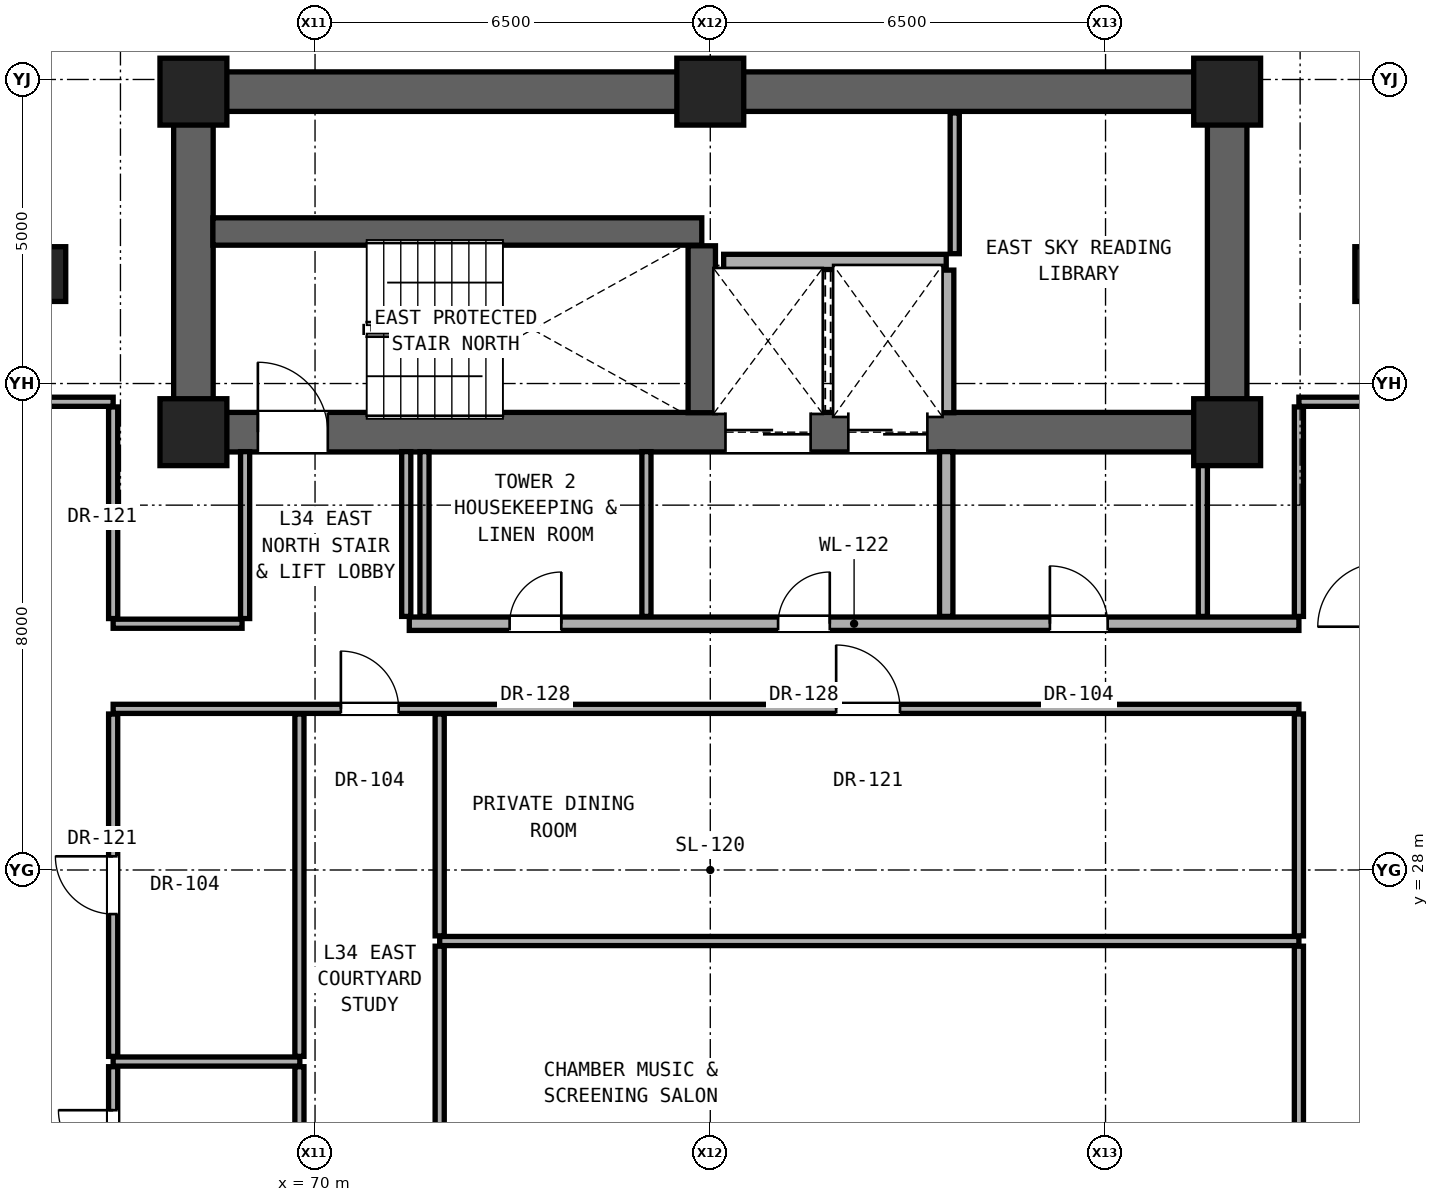
"""IFC4 building model, lengths in metres.
Left out: names, types, materials, properties, quantities, classifications, styles, units other than length and angle.
Written with IfcOpenShell. Run it as: python <this file> out.ifc"""

import sys

from ifc_helpers import new_model, si_unit, direction, frame, frame_2d, origin, origin_2d, place, context, subcontext, project, spatial, rectangle, extrude, element, fill, save


model = new_model("IFC4")
c1 = context("Model", 3, precision=1e-05, world=origin(), true_north=direction((0.0, 1.0)))
c2 = subcontext(c1, "Body", "Model", "MODEL_VIEW")
j1 = project(units=[si_unit("LENGTHUNIT", "METRE"), si_unit("PLANEANGLEUNIT", "RADIAN")], contexts=[c1])
p1 = place(None, origin())
s1 = spatial("IfcSite", under=j1, at=p1, CompositionType="ELEMENT")
p2 = place(p1, origin())
s2 = spatial("IfcBuilding", under=s1, at=p2, CompositionType="ELEMENT")
p3 = place(p2, frame((0.0, 0.0, 121.4)))
s3 = spatial("IfcBuildingStorey", under=s2, at=p3, CompositionType="ELEMENT", Elevation=121.4)
for number, where, z_axis, x_axis in (
    (1, (68.0, 35.2, 0.0), (0.0, 0.0, 1.0), (1.0, 0.0, 0.0)),
    (2, (85.0, 35.2, 0.0), (0.0, 0.0, 1.0), (1.0, 0.0, 0.0)),
    (3, (68.0, 40.8, 0.0), (0.0, 0.0, 1.0), (1.0, 0.0, 0.0)),
    (4, (76.5, 40.8, 0.0), (0.0, 0.0, 1.0), (1.0, 0.0, 0.0)),
    (5, (85.0, 40.8, 0.0), (0.0, 0.0, 1.0), (1.0, 0.0, 0.0)),
):
    element("IfcColumn", number, at=place(p3, frame(where, z_axis=z_axis, x_axis=x_axis)), inside=s3, PredefinedType="COLUMN", context=c2, shape_type="SweptSolid", body=[
        extrude(rectangle(XDim=1.1, YDim=1.1, at=origin_2d()), origin(), (0.0, 0.0, 1.0), 3.3),
    ])
for number, where, z_axis, x_axis in (
    (6, (65.6, 37.8, 0.0), (0.0, 0.0, 1.0), (1.0, 0.0, 0.0)),
    (7, (87.4, 37.8, 0.0), (0.0, 0.0, 1.0), (1.0, 0.0, 0.0)),
):
    element("IfcColumn", number, at=place(p3, frame(where, z_axis=z_axis, x_axis=x_axis)), inside=s3, PredefinedType="PILASTER", context=c2, shape_type="SweptSolid", body=[
        extrude(rectangle(XDim=0.6, YDim=0.9, at=origin_2d()), origin(), (0.0, 0.0, 1.0), 3.3),
    ])
p4 = place(p3, frame((68.0, 40.8, 0.0), z_axis=(0.0, 0.0, 1.0), x_axis=(1.0, 0.0, 0.0)))
e8 = element("IfcWall", 8, at=p4, inside=s3, PredefinedType="SHEAR", context=c2, shape_type="SweptSolid", body=[
    extrude(rectangle(XDim=17.0, YDim=0.65, at=frame_2d((8.5, 0.0))), origin(), (0.0, 0.0, 1.0), 3.08),
])
for number, where, z_axis, x_axis in (
    (9, (68.0, 35.2, 0.0), (0.0, 0.0, 1.0), (0.0, 1.0, 0.0)),
    (10, (85.0, 35.2, 0.0), (0.0, 0.0, 1.0), (0.0, 1.0, 0.0)),
):
    element("IfcWall", number, at=place(p3, frame(where, z_axis=z_axis, x_axis=x_axis)), inside=s3, PredefinedType="SHEAR", context=c2, shape_type="SweptSolid", body=[
        extrude(rectangle(XDim=5.6, YDim=0.65, at=frame_2d((2.8, 0.0))), origin(), (0.0, 0.0, 1.0), 3.08),
    ])
p5 = place(p3, frame((68.0, 35.2, 0.0), z_axis=(0.0, 0.0, 1.0), x_axis=(1.0, 0.0, 0.0)))
e11 = element("IfcWall", 11, at=p5, inside=s3, PredefinedType="SHEAR", context=c2, shape_type="SweptSolid", body=[
    extrude(rectangle(XDim=17.0, YDim=0.65, at=frame_2d((8.5, 0.0))), origin(), (0.0, 0.0, 1.0), 3.08),
])
p6 = place(p5, frame((1.06, 0.0, 0.0)))
e12 = element("IfcOpeningElement", 12, at=p6, cuts=e11, PredefinedType="OPENING", context=c2, shape_type="SweptSolid", body=[
    extrude(rectangle(XDim=1.15, YDim=2.2, at=frame_2d((0.575, 1.1))), frame((0.0, 0.335, 0.0), z_axis=(0.0, -1.0, 0.0), x_axis=(1.0, 0.0, 0.0)), (0.0, 0.0, 1.0), 0.67),
])
p7 = place(p5, frame((8.75, 0.0, 0.0)))
e13 = element("IfcOpeningElement", 13, at=p7, cuts=e11, PredefinedType="OPENING", context=c2, shape_type="SweptSolid", body=[
    extrude(rectangle(XDim=1.4, YDim=2.35, at=frame_2d((0.7, 1.175))), frame((0.0, 0.335, 0.0), z_axis=(0.0, -1.0, 0.0), x_axis=(1.0, 0.0, 0.0)), (0.0, 0.0, 1.0), 0.67),
])
p8 = place(p5, frame((10.77, 0.0, 0.0)))
e14 = element("IfcOpeningElement", 14, at=p8, cuts=e11, PredefinedType="OPENING", context=c2, shape_type="SweptSolid", body=[
    extrude(rectangle(XDim=1.3, YDim=2.3, at=frame_2d((0.65, 1.15))), frame((0.0, 0.335, 0.0), z_axis=(0.0, -1.0, 0.0), x_axis=(1.0, 0.0, 0.0)), (0.0, 0.0, 1.0), 0.67),
])
p9 = place(p3, frame((66.68, 24.85, 0.0), z_axis=(0.0, 0.0, 1.0), x_axis=(1.0, 0.0, 0.0)))
e15 = element("IfcWall", 15, at=p9, inside=s3, PredefinedType="PARTITIONING", context=c2, shape_type="SweptSolid", body=[
    extrude(rectangle(XDim=3.07, YDim=0.15, at=frame_2d((1.535, 0.0))), origin(), (0.0, 0.0, 1.0), 2.216),
])
p10 = place(p3, frame((72.05, 26.832, 0.0), z_axis=(0.0, 0.0, 1.0), x_axis=(1.0, 0.0, 0.0)))
e16 = element("IfcWall", 16, at=p10, inside=s3, PredefinedType="PARTITIONING", context=c2, shape_type="SweptSolid", body=[
    extrude(rectangle(XDim=14.13, YDim=0.15, at=frame_2d((7.065, 0.0))), origin(), (0.0, 0.0, 1.0), 2.216),
])
p11 = place(p3, frame((66.68, 30.65, 0.0), z_axis=(0.0, 0.0, 1.0), x_axis=(1.0, 0.0, 0.0)))
e17 = element("IfcWall", 17, at=p11, inside=s3, PredefinedType="PARTITIONING", context=c2, shape_type="SweptSolid", body=[
    extrude(rectangle(XDim=19.5, YDim=0.15, at=frame_2d((9.75, 0.0))), origin(), (0.0, 0.0, 1.0), 2.216),
])
p12 = place(p11, frame((3.745, 0.0, 0.0)))
e18 = element("IfcOpeningElement", 18, at=p12, cuts=e17, PredefinedType="OPENING", context=c2, shape_type="SweptSolid", body=[
    extrude(rectangle(XDim=0.95, YDim=2.15, at=frame_2d((0.475, 1.075))), frame((0.0, 0.085, 0.0), z_axis=(0.0, -1.0, 0.0), x_axis=(1.0, 0.0, 0.0)), (0.0, 0.0, 1.0), 0.17),
])
p13 = place(p11, frame((11.89, 0.0, 0.0)))
e19 = element("IfcOpeningElement", 19, at=p13, cuts=e17, PredefinedType="OPENING", context=c2, shape_type="SweptSolid", body=[
    extrude(rectangle(XDim=1.05, YDim=2.2, at=frame_2d((0.525, 1.1))), frame((0.0, 0.085, 0.0), z_axis=(0.0, -1.0, 0.0), x_axis=(1.0, 0.0, 0.0)), (0.0, 0.0, 1.0), 0.17),
])
p14 = place(p3, frame((66.68, 32.05, 0.0), z_axis=(0.0, 0.0, 1.0), x_axis=(1.0, 0.0, 0.0)))
e20 = element("IfcWall", 20, at=p14, inside=s3, PredefinedType="PARTITIONING", context=c2, shape_type="SweptSolid", body=[
    extrude(rectangle(XDim=2.12, YDim=0.15, at=frame_2d((1.06, 0.0))), origin(), (0.0, 0.0, 1.0), 2.216),
])
p15 = place(p3, frame((71.55, 32.05, 0.0), z_axis=(0.0, 0.0, 1.0), x_axis=(1.0, 0.0, 0.0)))
e21 = element("IfcWall", 21, at=p15, inside=s3, PredefinedType="SOLIDWALL", context=c2, shape_type="SweptSolid", body=[
    extrude(rectangle(XDim=14.63, YDim=0.22, at=frame_2d((7.315, 0.0))), origin(), (0.0, 0.0, 1.0), 2.216),
])
p16 = place(p15, frame((6.065, 0.0, 0.0)))
e22 = element("IfcOpeningElement", 22, at=p16, cuts=e21, PredefinedType="OPENING", context=c2, shape_type="SweptSolid", body=[
    extrude(rectangle(XDim=0.85, YDim=2.01, at=frame_2d((0.425, 1.005))), frame((0.0, 0.12, 0.0), z_axis=(0.0, -1.0, 0.0), x_axis=(1.0, 0.0, 0.0)), (0.0, 0.0, 1.0), 0.24),
])
p17 = place(p15, frame((10.535, 0.0, 0.0)))
e23 = element("IfcOpeningElement", 23, at=p17, cuts=e21, PredefinedType="OPENING", context=c2, shape_type="SweptSolid", body=[
    extrude(rectangle(XDim=0.95, YDim=2.15, at=frame_2d((0.475, 1.075))), frame((0.0, 0.12, 0.0), z_axis=(0.0, -1.0, 0.0), x_axis=(1.0, 0.0, 0.0)), (0.0, 0.0, 1.0), 0.24),
])
p18 = place(p15, frame((1.65, 0.0, 0.0)))
e24 = element("IfcOpeningElement", 24, at=p18, cuts=e21, PredefinedType="OPENING", context=c2, shape_type="SweptSolid", body=[
    extrude(rectangle(XDim=0.85, YDim=2.01, at=frame_2d((0.425, 1.005))), frame((0.0, 0.12, 0.0), z_axis=(0.0, -1.0, 0.0), x_axis=(1.0, 0.0, 0.0)), (0.0, 0.0, 1.0), 0.24),
])
p19 = place(p3, frame((65.32, 35.7, 0.0), z_axis=(0.0, 0.0, 1.0), x_axis=(1.0, 0.0, 0.0)))
e25 = element("IfcWall", 25, at=p19, inside=s3, PredefinedType="PARTITIONING", context=c2, shape_type="SweptSolid", body=[
    extrude(rectangle(XDim=1.36, YDim=0.15, at=frame_2d((0.68, 0.0))), origin(), (0.0, 0.0, 1.0), 3.08),
])
p20 = place(p3, frame((86.18, 35.7, 0.0), z_axis=(0.0, 0.0, 1.0), x_axis=(1.0, 0.0, 0.0)))
e26 = element("IfcWall", 26, at=p20, inside=s3, PredefinedType="PARTITIONING", context=c2, shape_type="SweptSolid", body=[
    extrude(rectangle(XDim=1.36, YDim=0.15, at=frame_2d((0.68, 0.0))), origin(), (0.0, 0.0, 1.0), 3.08),
])
p21 = place(p3, frame((76.72, 38.0, 0.0), z_axis=(0.0, 0.0, 1.0), x_axis=(1.0, 0.0, 0.0)))
e27 = element("IfcWall", 27, at=p21, inside=s3, PredefinedType="SOLIDWALL", context=c2, shape_type="SweptSolid", body=[
    extrude(rectangle(XDim=3.66, YDim=0.25, at=frame_2d((1.83, 0.0))), origin(), (0.0, 0.0, 1.0), 3.08),
])
p22 = place(p3, frame((68.32, 38.5, 0.0), z_axis=(0.0, 0.0, 1.0), x_axis=(1.0, 0.0, 0.0)))
e28 = element("IfcWall", 28, at=p22, inside=s3, PredefinedType="SHEAR", context=c2, shape_type="SweptSolid", body=[
    extrude(rectangle(XDim=8.04, YDim=0.45, at=frame_2d((4.02, 0.0))), origin(), (0.0, 0.0, 1.0), 3.08),
])
p23 = place(p3, frame((66.68, 22.435, 0.0), z_axis=(0.0, 0.0, 1.0), x_axis=(0.0, 1.0, 0.0)))
e29 = element("IfcWall", 29, at=p23, inside=s3, PredefinedType="PARTITIONING", context=c2, shape_type="SweptSolid", body=[
    extrude(rectangle(XDim=2.33, YDim=0.15, at=frame_2d((1.165, 0.0))), origin(), (0.0, 0.0, 1.0), 3.08),
])
p24 = place(p23, frame((0.715, 0.0, 0.0)))
e30 = element("IfcOpeningElement", 30, at=p24, cuts=e29, PredefinedType="OPENING", context=c2, shape_type="SweptSolid", body=[
    extrude(rectangle(XDim=0.9, YDim=2.1, at=frame_2d((0.45, 1.05))), frame((0.0, 0.085, 0.0), z_axis=(0.0, -1.0, 0.0), x_axis=(1.0, 0.0, 0.0)), (0.0, 0.0, 1.0), 0.17),
])
p25 = place(p3, frame((66.68, 24.935, 0.0), z_axis=(0.0, 0.0, 1.0), x_axis=(0.0, 1.0, 0.0)))
e31 = element("IfcWall", 31, at=p25, inside=s3, PredefinedType="PARTITIONING", context=c2, shape_type="SweptSolid", body=[
    extrude(rectangle(XDim=5.63, YDim=0.15, at=frame_2d((2.815, 0.0))), origin(), (0.0, 0.0, 1.0), 2.376),
])
p26 = place(p25, frame((2.34, 0.0, 0.0)))
e32 = element("IfcOpeningElement", 32, at=p26, cuts=e31, PredefinedType="OPENING", context=c2, shape_type="SweptSolid", body=[
    extrude(rectangle(XDim=0.95, YDim=2.15, at=frame_2d((0.475, 1.075))), frame((0.0, 0.085, 0.0), z_axis=(0.0, -1.0, 0.0), x_axis=(1.0, 0.0, 0.0)), (0.0, 0.0, 1.0), 0.17),
])
p27 = place(p3, frame((66.68, 32.135, 0.0), z_axis=(0.0, 0.0, 1.0), x_axis=(0.0, 1.0, 0.0)))
e33 = element("IfcWall", 33, at=p27, inside=s3, PredefinedType="PARTITIONING", context=c2, shape_type="SweptSolid", body=[
    extrude(rectangle(XDim=3.48, YDim=0.15, at=frame_2d((1.74, 0.0))), origin(), (0.0, 0.0, 1.0), 2.472),
])
p28 = place(p3, frame((68.85, 32.135, 0.0), z_axis=(0.0, 0.0, 1.0), x_axis=(0.0, 1.0, 0.0)))
e34 = element("IfcWall", 34, at=p28, inside=s3, PredefinedType="PARTITIONING", context=c2, shape_type="SweptSolid", body=[
    extrude(rectangle(XDim=2.745, YDim=0.15, at=frame_2d((1.373, 0.0))), origin(), (0.0, 0.0, 1.0), 3.08),
])
p29 = place(p3, frame((69.743, 22.435, 0.0), z_axis=(0.0, 0.0, 1.0), x_axis=(0.0, 1.0, 0.0)))
e35 = element("IfcWall", 35, at=p29, inside=s3, PredefinedType="PARTITIONING", context=c2, shape_type="SweptSolid", body=[
    extrude(rectangle(XDim=2.33, YDim=0.15, at=frame_2d((1.165, 0.0))), origin(), (0.0, 0.0, 1.0), 3.08),
])
p30 = place(p3, frame((69.743, 24.935, 0.0), z_axis=(0.0, 0.0, 1.0), x_axis=(0.0, 1.0, 0.0)))
e36 = element("IfcWall", 36, at=p30, inside=s3, PredefinedType="PARTITIONING", context=c2, shape_type="SweptSolid", body=[
    extrude(rectangle(XDim=5.63, YDim=0.15, at=frame_2d((2.815, 0.0))), origin(), (0.0, 0.0, 1.0), 2.216),
])
for number, where, z_axis, x_axis in (
    (37, (71.5, 32.17, 0.0), (0.0, 0.0, 1.0), (0.0, 1.0, 0.0)),
    (38, (71.8, 32.17, 0.0), (0.0, 0.0, 1.0), (0.0, 1.0, 0.0)),
):
    element("IfcWall", number, at=place(p3, frame(where, z_axis=z_axis, x_axis=x_axis)), inside=s3, PredefinedType="PARTITIONING", context=c2, shape_type="SweptSolid", body=[
        extrude(rectangle(XDim=2.71, YDim=0.15, at=frame_2d((1.355, 0.0))), origin(), (0.0, 0.0, 1.0), 3.08),
    ])
p31 = place(p3, frame((72.05, 22.435, 0.0), z_axis=(0.0, 0.0, 1.0), x_axis=(0.0, 1.0, 0.0)))
e39 = element("IfcWall", 39, at=p31, inside=s3, PredefinedType="PARTITIONING", context=c2, shape_type="SweptSolid", body=[
    extrude(rectangle(XDim=4.312, YDim=0.15, at=frame_2d((2.156, 0.0))), origin(), (0.0, 0.0, 1.0), 3.08),
])
p32 = place(p3, frame((72.05, 26.917, 0.0), z_axis=(0.0, 0.0, 1.0), x_axis=(0.0, 1.0, 0.0)))
e40 = element("IfcWall", 40, at=p32, inside=s3, PredefinedType="PARTITIONING", context=c2, shape_type="SweptSolid", body=[
    extrude(rectangle(XDim=3.648, YDim=0.15, at=frame_2d((1.824, 0.0))), origin(), (0.0, 0.0, 1.0), 2.216),
])
p33 = place(p3, frame((75.45, 32.17, 0.0), z_axis=(0.0, 0.0, 1.0), x_axis=(0.0, 1.0, 0.0)))
e41 = element("IfcWall", 41, at=p33, inside=s3, PredefinedType="PARTITIONING", context=c2, shape_type="SweptSolid", body=[
    extrude(rectangle(XDim=2.71, YDim=0.15, at=frame_2d((1.355, 0.0))), origin(), (0.0, 0.0, 1.0), 3.08),
])
p34 = place(p3, frame((76.36, 35.52, 0.0), z_axis=(0.0, 0.0, 1.0), x_axis=(0.0, 1.0, 0.0)))
e42 = element("IfcWall", 42, at=p34, inside=s3, PredefinedType="SHEAR", context=c2, shape_type="SweptSolid", body=[
    extrude(rectangle(XDim=2.745, YDim=0.45, at=frame_2d((1.373, 0.0))), origin(), (0.0, 0.0, 1.0), 3.08),
])
p35 = place(p3, frame((80.38, 32.17, 0.0), z_axis=(0.0, 0.0, 1.0), x_axis=(0.0, 1.0, 0.0)))
e43 = element("IfcWall", 43, at=p35, inside=s3, PredefinedType="SOLIDWALL", context=c2, shape_type="SweptSolid", body=[
    extrude(rectangle(XDim=2.71, YDim=0.22, at=frame_2d((1.355, 0.0))), origin(), (0.0, 0.0, 1.0), 3.08),
])
p36 = place(p3, frame((80.38, 35.52, 0.0), z_axis=(0.0, 0.0, 1.0), x_axis=(0.0, 1.0, 0.0)))
e44 = element("IfcWall", 44, at=p36, inside=s3, PredefinedType="SOLIDWALL", context=c2, shape_type="SweptSolid", body=[
    extrude(rectangle(XDim=2.345, YDim=0.25, at=frame_2d((1.172, 0.0))), origin(), (0.0, 0.0, 1.0), 3.08),
])
p37 = place(p3, frame((80.52, 38.135, 0.0), z_axis=(0.0, 0.0, 1.0), x_axis=(0.0, 1.0, 0.0)))
e45 = element("IfcWall", 45, at=p37, inside=s3, PredefinedType="PARTITIONING", context=c2, shape_type="SweptSolid", body=[
    extrude(rectangle(XDim=2.315, YDim=0.15, at=frame_2d((1.157, 0.0))), origin(), (0.0, 0.0, 1.0), 3.08),
])
p38 = place(p3, frame((84.6, 32.17, 0.0), z_axis=(0.0, 0.0, 1.0), x_axis=(0.0, 1.0, 0.0)))
e46 = element("IfcWall", 46, at=p38, inside=s3, PredefinedType="PARTITIONING", context=c2, shape_type="SweptSolid", body=[
    extrude(rectangle(XDim=2.71, YDim=0.15, at=frame_2d((1.355, 0.0))), origin(), (0.0, 0.0, 1.0), 3.08),
])
p39 = place(p3, frame((86.18, 22.435, 0.0), z_axis=(0.0, 0.0, 1.0), x_axis=(0.0, 1.0, 0.0)))
e47 = element("IfcWall", 47, at=p39, inside=s3, PredefinedType="PARTITIONING", context=c2, shape_type="SweptSolid", body=[
    extrude(rectangle(XDim=4.312, YDim=0.15, at=frame_2d((2.156, 0.0))), origin(), (0.0, 0.0, 1.0), 3.08),
])
p40 = place(p3, frame((86.18, 26.917, 0.0), z_axis=(0.0, 0.0, 1.0), x_axis=(0.0, 1.0, 0.0)))
e48 = element("IfcWall", 48, at=p40, inside=s3, PredefinedType="PARTITIONING", context=c2, shape_type="SweptSolid", body=[
    extrude(rectangle(XDim=3.648, YDim=0.15, at=frame_2d((1.824, 0.0))), origin(), (0.0, 0.0, 1.0), 2.376),
])
p41 = place(p3, frame((86.18, 32.17, 0.0), z_axis=(0.0, 0.0, 1.0), x_axis=(0.0, 1.0, 0.0)))
e49 = element("IfcWall", 49, at=p41, inside=s3, PredefinedType="PARTITIONING", context=c2, shape_type="SweptSolid", body=[
    extrude(rectangle(XDim=3.445, YDim=0.15, at=frame_2d((1.723, 0.0))), origin(), (0.0, 0.0, 1.0), 2.472),
])
p42 = place(p6, origin())
e50 = element("IfcDoor", 50, at=p42, inside=s3, OperationType="SINGLE_SWING_LEFT", PredefinedType="DOOR", context=c2, shape_type="SweptSolid", body=[
    extrude(rectangle(XDim=1.15, YDim=2.2, at=frame_2d((0.575, 1.1))), frame((0.0, 0.025, 0.0), z_axis=(0.0, -1.0, 0.0), x_axis=(1.0, 0.0, 0.0)), (0.0, 0.0, 1.0), 0.05),
])
fill(e12, e50)
p43 = place(p16, origin())
e51 = element("IfcDoor", 51, at=p43, inside=s3, OperationType="SINGLE_SWING_RIGHT", PredefinedType="DOOR", context=c2, shape_type="SweptSolid", body=[
    extrude(rectangle(XDim=0.85, YDim=2.01, at=frame_2d((0.425, 1.005))), frame((0.0, 0.025, 0.0), z_axis=(0.0, -1.0, 0.0), x_axis=(1.0, 0.0, 0.0)), (0.0, 0.0, 1.0), 0.05),
])
fill(e22, e51)
p44 = place(p17, origin())
e52 = element("IfcDoor", 52, at=p44, inside=s3, OperationType="SINGLE_SWING_LEFT", PredefinedType="DOOR", context=c2, shape_type="SweptSolid", body=[
    extrude(rectangle(XDim=0.95, YDim=2.15, at=frame_2d((0.475, 1.075))), frame((0.0, 0.025, 0.0), z_axis=(0.0, -1.0, 0.0), x_axis=(1.0, 0.0, 0.0)), (0.0, 0.0, 1.0), 0.05),
])
fill(e23, e52)
p45 = place(p18, origin())
e53 = element("IfcDoor", 53, at=p45, inside=s3, OperationType="SINGLE_SWING_RIGHT", PredefinedType="DOOR", context=c2, shape_type="SweptSolid", body=[
    extrude(rectangle(XDim=0.85, YDim=2.01, at=frame_2d((0.425, 1.005))), frame((0.0, 0.025, 0.0), z_axis=(0.0, -1.0, 0.0), x_axis=(1.0, 0.0, 0.0)), (0.0, 0.0, 1.0), 0.05),
])
fill(e24, e53)
p46 = place(p24, origin())
e54 = element("IfcDoor", 54, at=p46, inside=s3, OperationType="SINGLE_SWING_RIGHT", PredefinedType="DOOR", context=c2, shape_type="SweptSolid", body=[
    extrude(rectangle(XDim=0.9, YDim=2.1, at=frame_2d((0.45, 1.05))), frame((0.0, 0.025, 0.0), z_axis=(0.0, -1.0, 0.0), x_axis=(1.0, 0.0, 0.0)), (0.0, 0.0, 1.0), 0.05),
])
fill(e30, e54)
p47 = place(p26, origin())
e55 = element("IfcDoor", 55, at=p47, inside=s3, OperationType="SINGLE_SWING_RIGHT", PredefinedType="DOOR", context=c2, shape_type="SweptSolid", body=[
    extrude(rectangle(XDim=0.95, YDim=2.15, at=frame_2d((0.475, 1.075))), frame((0.0, 0.025, 0.0), z_axis=(0.0, -1.0, 0.0), x_axis=(1.0, 0.0, 0.0)), (0.0, 0.0, 1.0), 0.05),
])
fill(e32, e55)
p48 = place(p12, origin())
e56 = element("IfcDoor", 56, at=p48, inside=s3, OperationType="SINGLE_SWING_LEFT", PredefinedType="DOOR", context=c2, shape_type="SweptSolid", body=[
    extrude(rectangle(XDim=0.95, YDim=2.15, at=frame_2d((0.475, 1.075))), frame((0.0, 0.025, 0.0), z_axis=(0.0, -1.0, 0.0), x_axis=(1.0, 0.0, 0.0)), (0.0, 0.0, 1.0), 0.05),
])
fill(e18, e56)
p49 = place(p13, origin())
e57 = element("IfcDoor", 57, at=p49, inside=s3, OperationType="SINGLE_SWING_LEFT", PredefinedType="DOOR", context=c2, shape_type="SweptSolid", body=[
    extrude(rectangle(XDim=1.05, YDim=2.2, at=frame_2d((0.525, 1.1))), frame((0.0, 0.025, 0.0), z_axis=(0.0, -1.0, 0.0), x_axis=(1.0, 0.0, 0.0)), (0.0, 0.0, 1.0), 0.05),
])
fill(e19, e57)
p50 = place(p7, origin())
e58 = element("IfcDoor", 58, at=p50, inside=s3, OperationType="DOUBLE_DOOR_SLIDING", PredefinedType="DOOR", context=c2, shape_type="SweptSolid", body=[
    extrude(rectangle(XDim=1.4, YDim=2.35, at=frame_2d((0.7, 1.175))), frame((0.0, 0.025, 0.0), z_axis=(0.0, -1.0, 0.0), x_axis=(1.0, 0.0, 0.0)), (0.0, 0.0, 1.0), 0.05),
])
fill(e13, e58)
p51 = place(p8, origin())
e59 = element("IfcDoor", 59, at=p51, inside=s3, OperationType="DOUBLE_DOOR_SLIDING", PredefinedType="DOOR", context=c2, shape_type="SweptSolid", body=[
    extrude(rectangle(XDim=1.3, YDim=2.3, at=frame_2d((0.65, 1.15))), frame((0.0, 0.025, 0.0), z_axis=(0.0, -1.0, 0.0), x_axis=(1.0, 0.0, 0.0)), (0.0, 0.0, 1.0), 0.05),
])
fill(e14, e59)
save(model, sys.argv[1])
